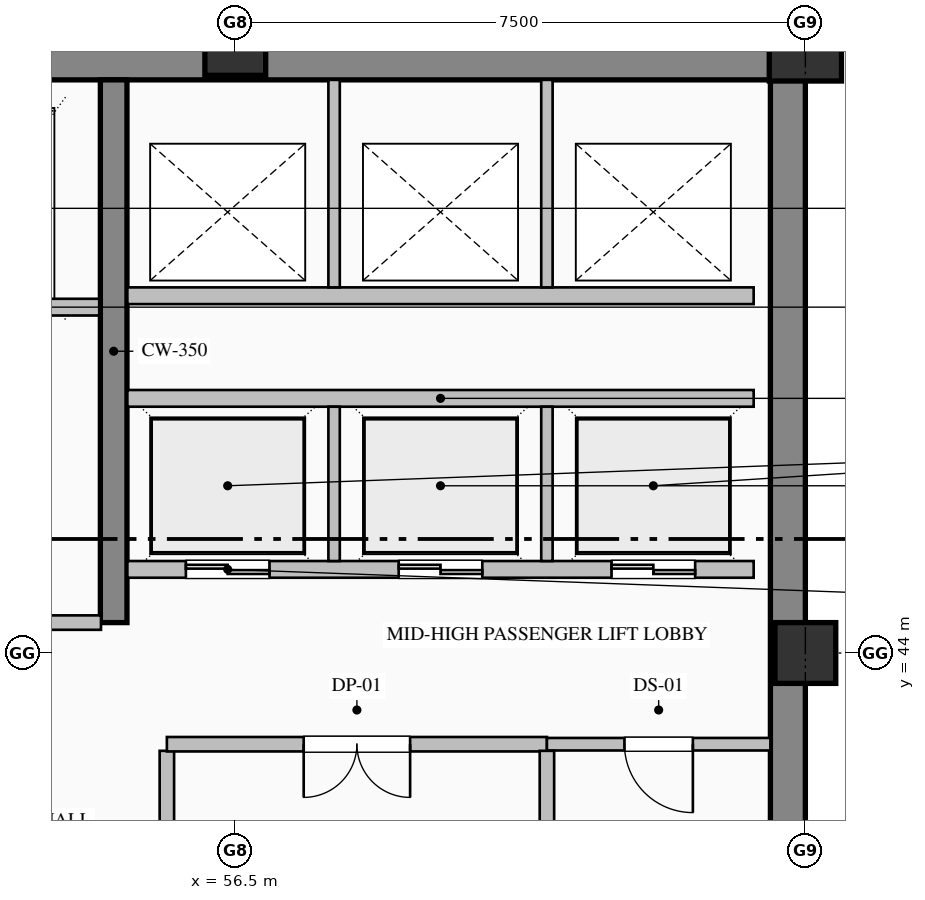
"""IFC4 building model, lengths in metres.
Left out: names, types, materials, properties, quantities, classifications, styles, units other than length and angle.
Written with IfcOpenShell. Run it as: python <this file> out.ifc"""

import sys

from ifc_helpers import new_model, si_unit, direction, frame, frame_2d, origin, origin_2d, place, context, subcontext, project, spatial, rectangle, hollow_rectangle, extrude, element, fill, save


model = new_model("IFC4")
c1 = context("Model", 3, precision=1e-05, world=origin(), true_north=direction((0.0, 1.0)))
c2 = subcontext(c1, "Body", "Model", "MODEL_VIEW")
j1 = project(units=[si_unit("LENGTHUNIT", "METRE"), si_unit("PLANEANGLEUNIT", "RADIAN")], contexts=[c1])
p1 = place(None, origin())
s1 = spatial("IfcSite", under=j1, at=p1, CompositionType="ELEMENT")
p2 = place(p1, origin())
s2 = spatial("IfcBuilding", under=s1, at=p2, CompositionType="ELEMENT")
p3 = place(p2, frame((0.0, 0.0, 277.8)))
s3 = spatial("IfcBuildingStorey", under=s2, at=p3, CompositionType="ELEMENT", Elevation=277.8)
p4 = place(p3, frame((40.5, 51.77, 0.0), z_axis=(0.0, 0.0, 1.0), x_axis=(1.0, 0.0, 0.0)))
e1 = element("IfcWall", 1, at=p4, inside=s3, PredefinedType="SHEAR", context=c2, shape_type="SweptSolid", body=[
    extrude(rectangle(XDim=23.5, YDim=0.46, at=frame_2d((11.75, 0.0))), origin(), (0.0, 0.0, 1.0), 3.65),
])
p5 = place(p3, frame((63.77, 36.32, 0.0), z_axis=(0.0, 0.0, 1.0), x_axis=(0.0, 1.0, 0.0)))
e2 = element("IfcWall", 2, at=p5, inside=s3, PredefinedType="SHEAR", context=c2, shape_type="SweptSolid", body=[
    extrude(rectangle(XDim=15.22, YDim=0.46, at=frame_2d((7.61, 0.0))), origin(), (0.0, 0.0, 1.0), 3.65),
])
p6 = place(p3, frame((54.9, 44.4, 0.0), z_axis=(0.0, 0.0, 1.0), x_axis=(0.0, 1.0, 0.0)))
e3 = element("IfcWall", 3, at=p6, inside=s3, PredefinedType="SHEAR", context=c2, shape_type="SweptSolid", body=[
    extrude(rectangle(XDim=7.14, YDim=0.35, at=frame_2d((3.57, 0.0))), origin(), (0.0, 0.0, 1.0), 3.65),
])
for number, where, z_axis, x_axis in (
    (4, (56.5, 52.0, 0.0), (0.0, 0.0, 1.0), (1.0, 0.0, 0.0)),
    (5, (64.0, 44.0, 0.0), (0.0, 0.0, 1.0), (1.0, 0.0, 0.0)),
):
    element("IfcColumn", number, at=place(p3, frame(where, z_axis=z_axis, x_axis=x_axis)), inside=s3, PredefinedType="COLUMN", context=c2, shape_type="SweptSolid", body=[
        extrude(hollow_rectangle(XDim=0.8, YDim=0.8, WallThickness=0.032, at=origin_2d()), origin(), (0.0, 0.0, 1.0), 4.0),
    ])
p7 = place(p3, frame((64.0, 52.0, 0.0), z_axis=(0.0, 0.0, 1.0), x_axis=(1.0, 0.0, 0.0)))
e6 = element("IfcColumn", 6, at=p7, inside=s3, PredefinedType="COLUMN", context=c2, shape_type="SweptSolid", body=[
    extrude(hollow_rectangle(XDim=0.95, YDim=0.95, WallThickness=0.036, at=origin_2d()), origin(), (0.0, 0.0, 1.0), 4.0),
])
p8 = place(p3, frame((54.71, 48.55, 0.0), z_axis=(0.0, 0.0, 1.0), x_axis=(-1.0, 0.0, 0.0)))
e7 = element("IfcWall", 7, at=p8, inside=s3, PredefinedType="PARTITIONING", context=c2, shape_type="SweptSolid", body=[
    extrude(rectangle(XDim=5.12, YDim=0.22, at=frame_2d((2.56, 0.0))), origin(), (0.0, 0.0, 1.0), 3.65),
])
p9 = place(p8, frame((3.735, 0.0, 0.0)))
e8 = element("IfcOpeningElement", 8, at=p9, cuts=e7, PredefinedType="OPENING", context=c2, shape_type="SweptSolid", body=[
    extrude(rectangle(XDim=1.15, YDim=2.2, at=frame_2d((0.575, 1.1))), frame((0.0, 0.12, 0.0), z_axis=(0.0, -1.0, 0.0), x_axis=(1.0, 0.0, 0.0)), (0.0, 0.0, 1.0), 0.24),
])
p10 = place(p8, frame((0.935, 0.0, 0.0)))
e9 = element("IfcOpeningElement", 9, at=p10, cuts=e7, PredefinedType="OPENING", context=c2, shape_type="SweptSolid", body=[
    extrude(rectangle(XDim=1.15, YDim=2.2, at=frame_2d((0.575, 1.1))), frame((0.0, 0.12, 0.0), z_axis=(0.0, -1.0, 0.0), x_axis=(1.0, 0.0, 0.0)), (0.0, 0.0, 1.0), 0.24),
])
p11 = place(p3, frame((63.32, 45.1, 0.0), z_axis=(0.0, 0.0, 1.0), x_axis=(-1.0, 0.0, 0.0)))
e10 = element("IfcWall", 10, at=p11, inside=s3, PredefinedType="PARTITIONING", context=c2, shape_type="SweptSolid", body=[
    extrude(rectangle(XDim=8.24, YDim=0.22, at=frame_2d((4.12, 0.0))), origin(), (0.0, 0.0, 1.0), 3.65),
])
p12 = place(p11, frame((6.37, 0.0, 0.0)))
e11 = element("IfcOpeningElement", 11, at=p12, cuts=e10, PredefinedType="OPENING", context=c2, shape_type="SweptSolid", body=[
    extrude(rectangle(XDim=1.1, YDim=2.2, at=frame_2d((0.55, 1.1))), frame((0.0, 0.12, 0.0), z_axis=(0.0, -1.0, 0.0), x_axis=(1.0, 0.0, 0.0)), (0.0, 0.0, 1.0), 0.24),
])
p13 = place(p11, frame((3.57, 0.0, 0.0)))
e12 = element("IfcOpeningElement", 12, at=p13, cuts=e10, PredefinedType="OPENING", context=c2, shape_type="SweptSolid", body=[
    extrude(rectangle(XDim=1.1, YDim=2.2, at=frame_2d((0.55, 1.1))), frame((0.0, 0.12, 0.0), z_axis=(0.0, -1.0, 0.0), x_axis=(1.0, 0.0, 0.0)), (0.0, 0.0, 1.0), 0.24),
])
p14 = place(p11, frame((0.77, 0.0, 0.0)))
e13 = element("IfcOpeningElement", 13, at=p14, cuts=e10, PredefinedType="OPENING", context=c2, shape_type="SweptSolid", body=[
    extrude(rectangle(XDim=1.1, YDim=2.2, at=frame_2d((0.55, 1.1))), frame((0.0, 0.12, 0.0), z_axis=(0.0, -1.0, 0.0), x_axis=(1.0, 0.0, 0.0)), (0.0, 0.0, 1.0), 0.24),
])
p15 = place(p3, frame((55.08, 47.35, 0.0), z_axis=(0.0, 0.0, 1.0), x_axis=(1.0, 0.0, 0.0)))
e14 = element("IfcWall", 14, at=p15, inside=s3, PredefinedType="PARTITIONING", context=c2, shape_type="SweptSolid", body=[
    extrude(rectangle(XDim=8.24, YDim=0.22, at=frame_2d((4.12, 0.0))), origin(), (0.0, 0.0, 1.0), 3.65),
])
for number, where, z_axis, x_axis in (
    (15, (57.8, 45.21, 0.0), (0.0, 0.0, 1.0), (0.0, 1.0, 0.0)),
    (16, (60.6, 45.21, 0.0), (0.0, 0.0, 1.0), (0.0, 1.0, 0.0)),
):
    element("IfcWall", number, at=place(p3, frame(where, z_axis=z_axis, x_axis=x_axis)), inside=s3, PredefinedType="PARTITIONING", context=c2, shape_type="SweptSolid", body=[
        extrude(rectangle(XDim=2.03, YDim=0.15, at=frame_2d((1.015, 0.0))), origin(), (0.0, 0.0, 1.0), 3.65),
    ])
p16 = place(p3, frame((63.32, 48.7, 0.0), z_axis=(0.0, 0.0, 1.0), x_axis=(-1.0, 0.0, 0.0)))
e17 = element("IfcWall", 17, at=p16, inside=s3, PredefinedType="PARTITIONING", context=c2, shape_type="SweptSolid", body=[
    extrude(rectangle(XDim=8.24, YDim=0.22, at=frame_2d((4.12, 0.0))), origin(), (0.0, 0.0, 1.0), 3.65),
])
for number, where, z_axis, x_axis in (
    (18, (57.8, 48.81, 0.0), (0.0, 0.0, 1.0), (0.0, 1.0, 0.0)),
    (19, (60.6, 48.81, 0.0), (0.0, 0.0, 1.0), (0.0, 1.0, 0.0)),
):
    element("IfcWall", number, at=place(p3, frame(where, z_axis=z_axis, x_axis=x_axis)), inside=s3, PredefinedType="PARTITIONING", context=c2, shape_type="SweptSolid", body=[
        extrude(rectangle(XDim=2.73, YDim=0.15, at=frame_2d((1.365, 0.0))), origin(), (0.0, 0.0, 1.0), 3.65),
    ])
p17 = place(p3, frame((54.733, 44.4, 0.0), z_axis=(0.0, 0.0, 1.0), x_axis=(-1.0, 0.0, 0.0)))
e20 = element("IfcWall", 20, at=p17, inside=s3, PredefinedType="PARTITIONING", context=c2, shape_type="SweptSolid", body=[
    extrude(rectangle(XDim=5.166, YDim=0.19, at=frame_2d((2.583, 0.0))), origin(), (0.0, 0.0, 1.0), 3.65),
])
p18 = place(p17, frame((2.058, 0.0, 0.0)))
e21 = element("IfcOpeningElement", 21, at=p18, cuts=e20, PredefinedType="OPENING", context=c2, shape_type="SweptSolid", body=[
    extrude(rectangle(XDim=1.05, YDim=2.15, at=frame_2d((0.525, 1.075))), frame((0.0, 0.105, 0.0), z_axis=(0.0, -1.0, 0.0), x_axis=(1.0, 0.0, 0.0)), (0.0, 0.0, 1.0), 0.21),
])
p19 = place(p3, frame((55.6, 42.713, 0.0), z_axis=(0.0, 0.0, 1.0), x_axis=(0.0, -1.0, 0.0)))
e22 = element("IfcWall", 22, at=p19, inside=s3, PredefinedType="PARTITIONING", context=c2, shape_type="SweptSolid", body=[
    extrude(rectangle(XDim=2.731, YDim=0.19, at=frame_2d((1.365, 0.0))), origin(), (0.0, 0.0, 1.0), 3.65),
])
p20 = place(p3, frame((60.6, 42.8, 0.0), z_axis=(0.0, 0.0, 1.0), x_axis=(-1.0, 0.0, 0.0)))
e23 = element("IfcWall", 23, at=p20, inside=s3, PredefinedType="PARTITIONING", context=c2, shape_type="SweptSolid", body=[
    extrude(rectangle(XDim=5.0, YDim=0.19, at=frame_2d((2.5, 0.0))), origin(), (0.0, 0.0, 1.0), 3.65),
])
p21 = place(p20, frame((1.8, 0.0, 0.0)))
e24 = element("IfcOpeningElement", 24, at=p21, cuts=e23, PredefinedType="OPENING", context=c2, shape_type="SweptSolid", body=[
    extrude(rectangle(XDim=1.4, YDim=2.25, at=frame_2d((0.7, 1.125))), frame((0.0, 0.105, 0.0), z_axis=(0.0, -1.0, 0.0), x_axis=(1.0, 0.0, 0.0)), (0.0, 0.0, 1.0), 0.21),
])
p22 = place(p3, frame((63.54, 42.8, 0.0), z_axis=(0.0, 0.0, 1.0), x_axis=(-1.0, 0.0, 0.0)))
e25 = element("IfcWall", 25, at=p22, inside=s3, PredefinedType="PARTITIONING", context=c2, shape_type="SweptSolid", body=[
    extrude(rectangle(XDim=2.94, YDim=0.165, at=frame_2d((1.47, 0.0))), origin(), (0.0, 0.0, 1.0), 3.65),
])
p23 = place(p22, frame((1.02, 0.0, 0.0)))
e26 = element("IfcOpeningElement", 26, at=p23, cuts=e25, PredefinedType="OPENING", context=c2, shape_type="SweptSolid", body=[
    extrude(rectangle(XDim=0.9, YDim=2.15, at=frame_2d((0.45, 1.075))), frame((0.0, 0.093, 0.0), z_axis=(0.0, -1.0, 0.0), x_axis=(1.0, 0.0, 0.0)), (0.0, 0.0, 1.0), 0.185),
])
p24 = place(p3, frame((60.6, 42.713, 0.0), z_axis=(0.0, 0.0, 1.0), x_axis=(0.0, -1.0, 0.0)))
e27 = element("IfcWall", 27, at=p24, inside=s3, PredefinedType="PARTITIONING", context=c2, shape_type="SweptSolid", body=[
    extrude(rectangle(XDim=2.731, YDim=0.19, at=frame_2d((1.365, 0.0))), origin(), (0.0, 0.0, 1.0), 3.65),
])
p25 = place(p12, origin())
e28 = element("IfcDoor", 28, at=p25, inside=s3, OperationType="DOUBLE_DOOR_SLIDING", PredefinedType="DOOR", context=c2, shape_type="SweptSolid", body=[
    extrude(rectangle(XDim=1.1, YDim=2.2, at=frame_2d((0.55, 1.1))), frame((0.0, 0.025, 0.0), z_axis=(0.0, -1.0, 0.0), x_axis=(1.0, 0.0, 0.0)), (0.0, 0.0, 1.0), 0.05),
])
fill(e11, e28)
p26 = place(p13, origin())
e29 = element("IfcDoor", 29, at=p26, inside=s3, OperationType="DOUBLE_DOOR_SLIDING", PredefinedType="DOOR", context=c2, shape_type="SweptSolid", body=[
    extrude(rectangle(XDim=1.1, YDim=2.2, at=frame_2d((0.55, 1.1))), frame((0.0, 0.025, 0.0), z_axis=(0.0, -1.0, 0.0), x_axis=(1.0, 0.0, 0.0)), (0.0, 0.0, 1.0), 0.05),
])
fill(e12, e29)
p27 = place(p14, origin())
e30 = element("IfcDoor", 30, at=p27, inside=s3, OperationType="DOUBLE_DOOR_SLIDING", PredefinedType="DOOR", context=c2, shape_type="SweptSolid", body=[
    extrude(rectangle(XDim=1.1, YDim=2.2, at=frame_2d((0.55, 1.1))), frame((0.0, 0.025, 0.0), z_axis=(0.0, -1.0, 0.0), x_axis=(1.0, 0.0, 0.0)), (0.0, 0.0, 1.0), 0.05),
])
fill(e13, e30)
p28 = place(p21, origin())
e31 = element("IfcDoor", 31, at=p28, inside=s3, OperationType="DOUBLE_DOOR_SINGLE_SWING", PredefinedType="DOOR", context=c2, shape_type="SweptSolid", body=[
    extrude(rectangle(XDim=1.4, YDim=2.25, at=frame_2d((0.7, 1.125))), frame((0.0, 0.025, 0.0), z_axis=(0.0, -1.0, 0.0), x_axis=(1.0, 0.0, 0.0)), (0.0, 0.0, 1.0), 0.05),
])
fill(e24, e31)
p29 = place(p23, origin())
e32 = element("IfcDoor", 32, at=p29, inside=s3, OperationType="SINGLE_SWING_LEFT", PredefinedType="DOOR", context=c2, shape_type="SweptSolid", body=[
    extrude(rectangle(XDim=0.9, YDim=2.15, at=frame_2d((0.45, 1.075))), frame((0.0, 0.025, 0.0), z_axis=(0.0, -1.0, 0.0), x_axis=(1.0, 0.0, 0.0)), (0.0, 0.0, 1.0), 0.05),
])
fill(e26, e32)
save(model, sys.argv[1])
